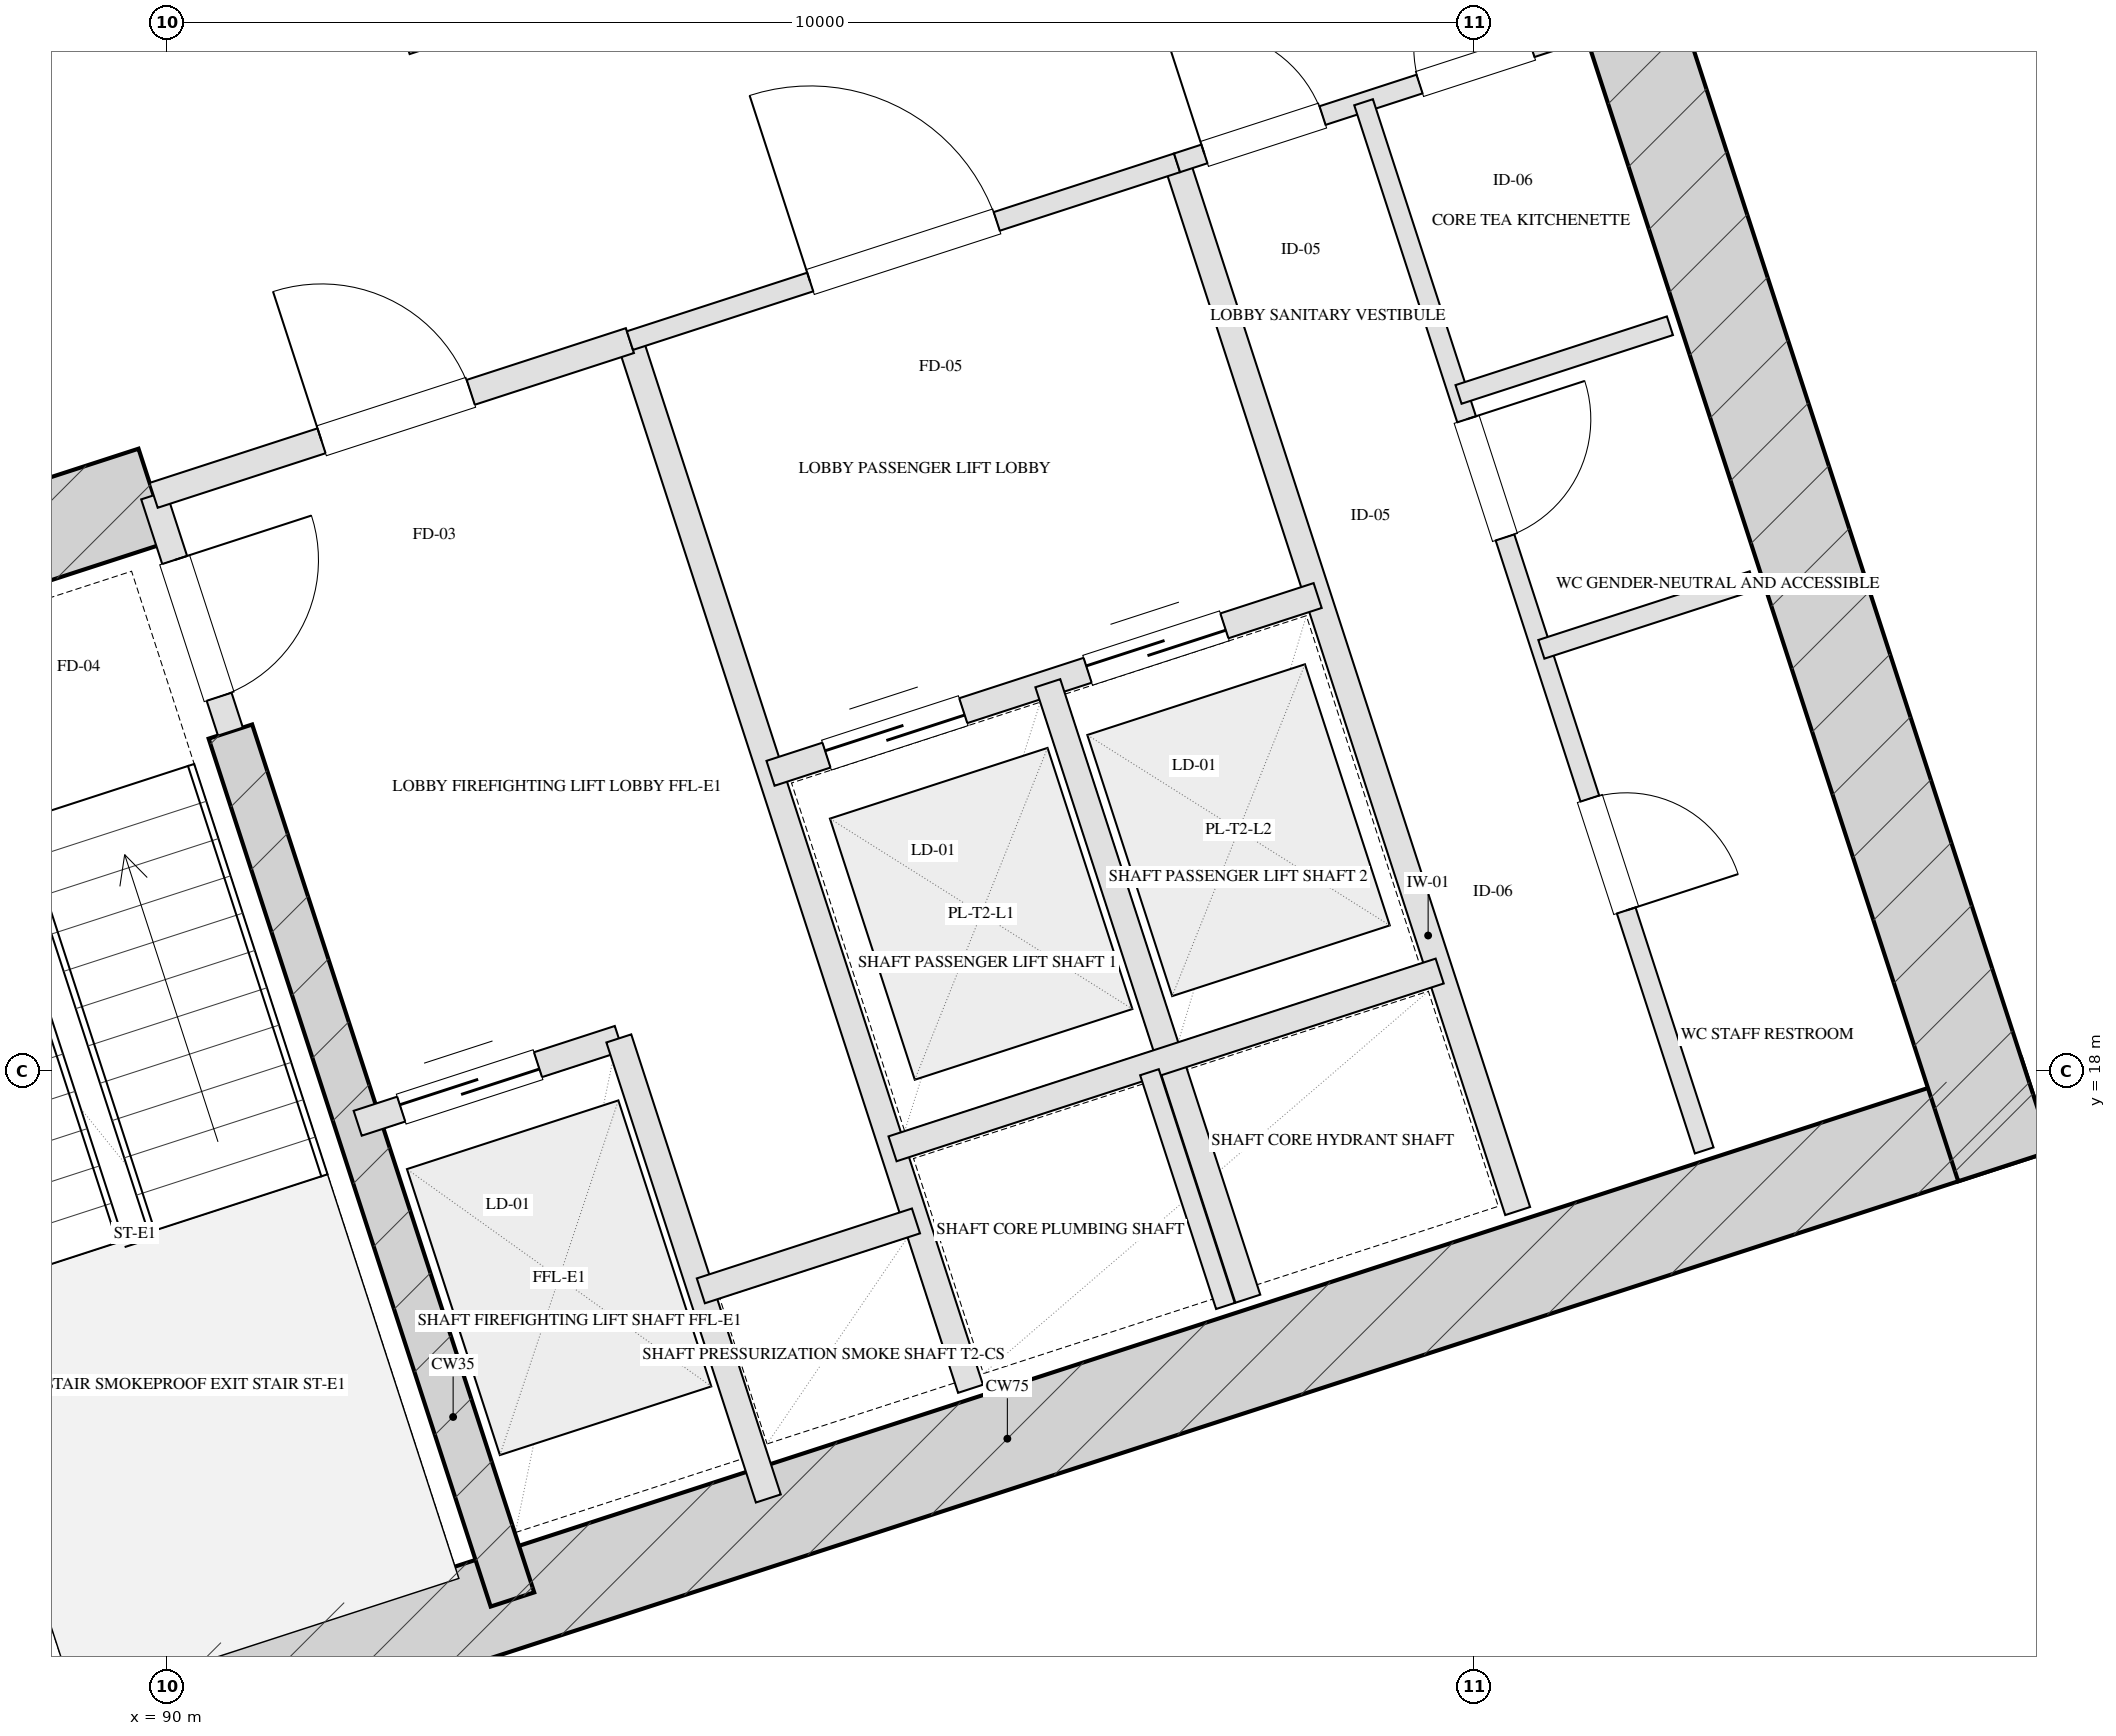
"""IFC4 building model, lengths in metres.
Left out: names, types, materials, properties, quantities, classifications, styles, units other than length and angle.
Written with IfcOpenShell. Run it as: python <this file> out.ifc"""

import sys

from ifc_helpers import new_model, si_unit, direction, frame, frame_2d, origin, place, context, subcontext, project, spatial, rectangle, extrude, element, fill, save


model = new_model("IFC4")
c1 = context("Model", 3, precision=1e-05, world=origin(), true_north=direction((0.0, 1.0)))
c2 = subcontext(c1, "Body", "Model", "MODEL_VIEW")
j1 = project(units=[si_unit("LENGTHUNIT", "METRE"), si_unit("PLANEANGLEUNIT", "RADIAN")], contexts=[c1])
p1 = place(None, origin())
s1 = spatial("IfcSite", under=j1, at=p1, CompositionType="ELEMENT")
p2 = place(p1, origin())
s2 = spatial("IfcBuilding", under=s1, at=p2, CompositionType="ELEMENT")
p3 = place(p2, frame((0.0, 0.0, 26.0)))
s3 = spatial("IfcBuildingStorey", under=s2, at=p3, CompositionType="ELEMENT", Elevation=26.0)
p4 = place(p3, frame((88.559, 12.629, 0.0), z_axis=(0.0, 0.0, 1.0), x_axis=(0.951056072937, 0.309018358888, 0.0)))
e1 = element("IfcWall", 1, at=p4, inside=s3, PredefinedType="SHEAR", context=c2, shape_type="SweptSolid", body=[
    extrude(rectangle(XDim=16.55, YDim=0.75, at=frame_2d((8.275, 0.0))), origin(), (0.0, 0.0, 1.0), 4.0),
])
p5 = place(p3, frame((86.055, 21.546, 0.0), z_axis=(0.0, 0.0, 1.0), x_axis=(0.309023585745, -0.951054374604, 0.0)))
e2 = element("IfcWall", 2, at=p5, inside=s3, PredefinedType="SHEAR", context=c2, shape_type="SweptSolid", body=[
    extrude(rectangle(XDim=9.63, YDim=0.75, at=frame_2d((4.815, 0.0))), origin(), (0.0, 0.0, 1.0), 4.0),
])
p6 = place(p3, frame((101.082, 26.429, 0.0), z_axis=(0.0, 0.0, 1.0), x_axis=(0.309016134813, -0.951056795583, 0.0)))
e3 = element("IfcWall", 3, at=p6, inside=s3, PredefinedType="SHEAR", context=c2, shape_type="SweptSolid", body=[
    extrude(rectangle(XDim=9.63, YDim=0.75, at=frame_2d((4.815, 0.0))), origin(), (0.0, 0.0, 1.0), 4.0),
])
p7 = place(p3, frame((90.486, 20.594, 0.0), z_axis=(0.0, 0.0, 1.0), x_axis=(0.309020428229, -0.951055400562, 0.0)))
e4 = element("IfcWall", 4, at=p7, inside=s3, PredefinedType="SHEAR", context=c2, shape_type="SweptSolid", body=[
    extrude(rectangle(XDim=6.98, YDim=0.35, at=frame_2d((3.49, 0.0))), origin(), (0.0, 0.0, 1.0), 4.0),
])
p8 = place(p3, frame((85.814, 21.074, 0.0), z_axis=(0.0, 0.0, 1.0), x_axis=(0.95106580992, 0.308988390074, 0.0)))
e5 = element("IfcWall", 5, at=p8, inside=s3, PredefinedType="SHEAR", context=c2, shape_type="SweptSolid", body=[
    extrude(rectangle(XDim=4.295, YDim=0.75, at=frame_2d((2.147, 0.0))), origin(), (0.0, 0.0, 1.0), 4.0),
])
p9 = place(p3, frame((100.345, 63.648, 0.0), z_axis=(0.0, 0.0, 1.0), x_axis=(0.309014526607, -0.951057318118, 0.0)))
e6 = element("IfcWall", 6, at=p9, inside=s3, PredefinedType="SOLIDWALL", context=c2, shape_type="SweptSolid", body=[
    extrude(rectangle(XDim=50.0, YDim=0.4, at=frame_2d((25.0, 0.0))), origin(), (0.0, 0.0, 1.0), 3.16),
])
p10 = place(p9, frame((30.15, 0.0, 0.75)))
e7 = element("IfcOpeningElement", 7, at=p10, cuts=e6, PredefinedType="OPENING", context=c2, shape_type="SweptSolid", body=[
    extrude(rectangle(XDim=2.5, YDim=1.75, at=frame_2d((1.25, 0.875))), frame((0.0, 0.21, 0.0), z_axis=(0.0, -1.0, 0.0), x_axis=(1.0, 0.0, 0.0)), (0.0, 0.0, 1.0), 0.42),
])
p11 = place(p9, frame((21.15, 0.0, 0.75)))
e8 = element("IfcOpeningElement", 8, at=p11, cuts=e6, PredefinedType="OPENING", context=c2, shape_type="SweptSolid", body=[
    extrude(rectangle(XDim=2.5, YDim=1.75, at=frame_2d((1.25, 0.875))), frame((0.0, 0.21, 0.0), z_axis=(0.0, -1.0, 0.0), x_axis=(1.0, 0.0, 0.0)), (0.0, 0.0, 1.0), 0.42),
])
p12 = place(p3, frame((89.899, 22.401, 0.0), z_axis=(0.0, 0.0, 1.0), x_axis=(0.308932062672, -0.951084108086, 0.0)))
e9 = element("IfcWall", 9, at=p12, inside=s3, PredefinedType="PARTITIONING", context=c2, shape_type="SweptSolid", body=[
    extrude(rectangle(XDim=1.9, YDim=0.2, at=frame_2d((0.95, 0.0))), origin(), (0.0, 0.0, 1.0), 3.725),
])
p13 = place(p12, frame((0.52, 0.0, 0.0)))
e10 = element("IfcOpeningElement", 10, at=p13, cuts=e9, PredefinedType="OPENING", context=c2, shape_type="SweptSolid", body=[
    extrude(rectangle(XDim=1.1, YDim=2.05, at=frame_2d((0.55, 1.025))), frame((0.0, 0.11, 0.0), z_axis=(0.0, -1.0, 0.0), x_axis=(1.0, 0.0, 0.0)), (0.0, 0.0, 1.0), 0.22),
])
p14 = place(p3, frame((93.542, 23.585, 0.0), z_axis=(0.0, 0.0, 1.0), x_axis=(0.309042196757, -0.951048327176, 0.0)))
e11 = element("IfcWall", 11, at=p14, inside=s3, PredefinedType="PARTITIONING", context=c2, shape_type="SweptSolid", body=[
    extrude(rectangle(XDim=8.43, YDim=0.2, at=frame_2d((4.215, 0.0))), origin(), (0.0, 0.0, 1.0), 3.725),
])
p15 = place(p3, frame((89.899, 22.401, 0.0), z_axis=(0.0, 0.0, 1.0), x_axis=(0.951046716504, 0.309047153403, 0.0)))
e12 = element("IfcWall", 12, at=p15, inside=s3, PredefinedType="PARTITIONING", context=c2, shape_type="SweptSolid", body=[
    extrude(rectangle(XDim=3.83, YDim=0.2, at=frame_2d((1.915, 0.0))), origin(), (0.0, 0.0, 1.0), 3.725),
])
p16 = place(p15, frame((1.35, 0.0, 0.0)))
e13 = element("IfcOpeningElement", 13, at=p16, cuts=e12, PredefinedType="OPENING", context=c2, shape_type="SweptSolid", body=[
    extrude(rectangle(XDim=1.2, YDim=2.05, at=frame_2d((0.6, 1.025))), frame((0.0, 0.11, 0.0), z_axis=(0.0, -1.0, 0.0), x_axis=(1.0, 0.0, 0.0)), (0.0, 0.0, 1.0), 0.22),
])
p17 = place(p3, frame((91.46, 17.598, 0.0), z_axis=(0.0, 0.0, 1.0), x_axis=(0.951062257173, 0.308999325213, 0.0)))
e14 = element("IfcWall", 14, at=p17, inside=s3, PredefinedType="PARTITIONING", context=c2, shape_type="SweptSolid", body=[
    extrude(rectangle(XDim=2.1, YDim=0.2, at=frame_2d((1.05, 0.0))), origin(), (0.0, 0.0, 1.0), 3.725),
])
p18 = place(p17, frame((0.35, 0.0, 0.0)))
e15 = element("IfcOpeningElement", 15, at=p18, cuts=e14, PredefinedType="OPENING", context=c2, shape_type="SweptSolid", body=[
    extrude(rectangle(XDim=1.1, YDim=2.05, at=frame_2d((0.55, 1.025))), frame((0.0, 0.11, 0.0), z_axis=(0.0, -1.0, 0.0), x_axis=(1.0, 0.0, 0.0)), (0.0, 0.0, 1.0), 0.22),
])
p19 = place(p3, frame((93.457, 18.247, 0.0), z_axis=(0.0, 0.0, 1.0), x_axis=(0.3089935693, -0.951064127245, 0.0)))
e16 = element("IfcWall", 16, at=p19, inside=s3, PredefinedType="PARTITIONING", context=c2, shape_type="SweptSolid", body=[
    extrude(rectangle(XDim=3.7, YDim=0.2, at=frame_2d((1.85, 0.0))), origin(), (0.0, 0.0, 1.0), 3.725),
])
p20 = place(p3, frame((94.084, 16.317, 0.0), z_axis=(0.0, 0.0, 1.0), x_axis=(0.951041328149, 0.309063734775, 0.0)))
e17 = element("IfcWall", 17, at=p20, inside=s3, PredefinedType="PARTITIONING", context=c2, shape_type="SweptSolid", body=[
    extrude(rectangle(XDim=1.73, YDim=0.2, at=frame_2d((0.865, 0.0))), origin(), (0.0, 0.0, 1.0), 3.725),
])
p21 = place(p3, frame((97.727, 24.944, 0.0), z_axis=(0.0, 0.0, 1.0), x_axis=(0.309016001439, -0.951056838919, 0.0)))
e18 = element("IfcWall", 18, at=p21, inside=s3, PredefinedType="PARTITIONING", context=c2, shape_type="SweptSolid", body=[
    extrude(rectangle(XDim=8.43, YDim=0.2, at=frame_2d((4.215, 0.0))), origin(), (0.0, 0.0, 1.0), 3.725),
])
p22 = place(p3, frame((93.542, 23.585, 0.0), z_axis=(0.0, 0.0, 1.0), x_axis=(0.951063829732, 0.308994485023, 0.0)))
e19 = element("IfcWall", 19, at=p22, inside=s3, PredefinedType="PARTITIONING", context=c2, shape_type="SweptSolid", body=[
    extrude(rectangle(XDim=4.4, YDim=0.15, at=frame_2d((2.2, 0.0))), origin(), (0.0, 0.0, 1.0), 3.725),
])
p23 = place(p22, frame((1.45, 0.0, 0.0)))
e20 = element("IfcOpeningElement", 20, at=p23, cuts=e19, PredefinedType="OPENING", context=c2, shape_type="SweptSolid", body=[
    extrude(rectangle(XDim=1.5, YDim=2.05, at=frame_2d((0.75, 1.025))), frame((0.0, 0.085, 0.0), z_axis=(0.0, -1.0, 0.0), x_axis=(1.0, 0.0, 0.0)), (0.0, 0.0, 1.0), 0.17),
])
p24 = place(p3, frame((94.617, 20.275, 0.0), z_axis=(0.0, 0.0, 1.0), x_axis=(0.951058531764, 0.30901079133, 0.0)))
e21 = element("IfcWall", 21, at=p24, inside=s3, PredefinedType="PARTITIONING", context=c2, shape_type="SweptSolid", body=[
    extrude(rectangle(XDim=4.4, YDim=0.2, at=frame_2d((2.2, 0.0))), origin(), (0.0, 0.0, 1.0), 3.725),
])
p25 = place(p24, frame((0.45, 0.0, 0.0)))
e22 = element("IfcOpeningElement", 22, at=p25, cuts=e21, PredefinedType="OPENING", context=c2, shape_type="SweptSolid", body=[
    extrude(rectangle(XDim=1.1, YDim=2.05, at=frame_2d((0.55, 1.025))), frame((0.0, 0.11, 0.0), z_axis=(0.0, -1.0, 0.0), x_axis=(1.0, 0.0, 0.0)), (0.0, 0.0, 1.0), 0.22),
])
p26 = place(p24, frame((2.55, 0.0, 0.0)))
e23 = element("IfcOpeningElement", 23, at=p26, cuts=e21, PredefinedType="OPENING", context=c2, shape_type="SweptSolid", body=[
    extrude(rectangle(XDim=1.1, YDim=2.05, at=frame_2d((0.55, 1.025))), frame((0.0, 0.11, 0.0), z_axis=(0.0, -1.0, 0.0), x_axis=(1.0, 0.0, 0.0)), (0.0, 0.0, 1.0), 0.22),
])
p27 = place(p3, frame((96.738, 20.964, 0.0), z_axis=(0.0, 0.0, 1.0), x_axis=(0.309042578481, -0.951048203135, 0.0)))
e24 = element("IfcWall", 24, at=p27, inside=s3, PredefinedType="PARTITIONING", context=c2, shape_type="SweptSolid", body=[
    extrude(rectangle(XDim=4.95, YDim=0.2, at=frame_2d((2.475, 0.0))), origin(), (0.0, 0.0, 1.0), 3.725),
])
p28 = place(p3, frame((95.551, 17.403, 0.0), z_axis=(0.0, 0.0, 1.0), x_axis=(0.951058531764, 0.30901079133, 0.0)))
e25 = element("IfcWall", 25, at=p28, inside=s3, PredefinedType="PARTITIONING", context=c2, shape_type="SweptSolid", body=[
    extrude(rectangle(XDim=4.4, YDim=0.2, at=frame_2d((2.2, 0.0))), origin(), (0.0, 0.0, 1.0), 3.725),
])
p29 = place(p3, frame((97.516, 17.989, 0.0), z_axis=(0.0, 0.0, 1.0), x_axis=(0.30897153969, -0.951071284217, 0.0)))
e26 = element("IfcWall", 26, at=p29, inside=s3, PredefinedType="PARTITIONING", context=c2, shape_type="SweptSolid", body=[
    extrude(rectangle(XDim=1.88, YDim=0.15, at=frame_2d((0.94, 0.0))), origin(), (0.0, 0.0, 1.0), 3.725),
])
p30 = place(p3, frame((97.727, 24.944, 0.0), z_axis=(0.0, 0.0, 1.0), x_axis=(0.951036872128, 0.309077446369, 0.0)))
e27 = element("IfcWall", 27, at=p30, inside=s3, PredefinedType="PARTITIONING", context=c2, shape_type="SweptSolid", body=[
    extrude(rectangle(XDim=3.2, YDim=0.15, at=frame_2d((1.6, 0.0))), origin(), (0.0, 0.0, 1.0), 3.725),
])
p31 = place(p30, frame((0.22, 0.0, 0.0)))
e28 = element("IfcOpeningElement", 28, at=p31, cuts=e27, PredefinedType="OPENING", context=c2, shape_type="SweptSolid", body=[
    extrude(rectangle(XDim=0.95, YDim=2.05, at=frame_2d((0.475, 1.025))), frame((0.0, 0.085, 0.0), z_axis=(0.0, -1.0, 0.0), x_axis=(1.0, 0.0, 0.0)), (0.0, 0.0, 1.0), 0.17),
])
p32 = place(p30, frame((1.95, 0.0, 0.0)))
e29 = element("IfcOpeningElement", 29, at=p32, cuts=e27, PredefinedType="OPENING", context=c2, shape_type="SweptSolid", body=[
    extrude(rectangle(XDim=0.9, YDim=2.05, at=frame_2d((0.45, 1.025))), frame((0.0, 0.085, 0.0), z_axis=(0.0, -1.0, 0.0), x_axis=(1.0, 0.0, 0.0)), (0.0, 0.0, 1.0), 0.17),
])
p33 = place(p3, frame((99.153, 25.408, 0.0), z_axis=(0.0, 0.0, 1.0), x_axis=(0.309016001439, -0.951056838919, 0.0)))
e30 = element("IfcWall", 30, at=p33, inside=s3, PredefinedType="PARTITIONING", context=c2, shape_type="SweptSolid", body=[
    extrude(rectangle(XDim=8.43, YDim=0.15, at=frame_2d((4.215, 0.0))), origin(), (0.0, 0.0, 1.0), 3.725),
])
p34 = place(p33, frame((2.55, 0.0, 0.0)))
e31 = element("IfcOpeningElement", 31, at=p34, cuts=e30, PredefinedType="OPENING", context=c2, shape_type="SweptSolid", body=[
    extrude(rectangle(XDim=0.95, YDim=2.05, at=frame_2d((0.475, 1.025))), frame((0.0, 0.085, 0.0), z_axis=(0.0, -1.0, 0.0), x_axis=(1.0, 0.0, 0.0)), (0.0, 0.0, 1.0), 0.17),
])
p35 = place(p33, frame((5.6, 0.0, 0.0)))
e32 = element("IfcOpeningElement", 32, at=p35, cuts=e30, PredefinedType="OPENING", context=c2, shape_type="SweptSolid", body=[
    extrude(rectangle(XDim=0.9, YDim=2.05, at=frame_2d((0.45, 1.025))), frame((0.0, 0.085, 0.0), z_axis=(0.0, -1.0, 0.0), x_axis=(1.0, 0.0, 0.0)), (0.0, 0.0, 1.0), 0.17),
])
for number, where, z_axis, x_axis in (
    (33, (100.513, 21.223, 0.0), (0.0, 0.0, 1.0), (0.951, 0.309, 0.0)),
    (34, (99.879, 23.173, 0.0), (0.0, 0.0, 1.0), (0.951, 0.309, 0.0)),
):
    element("IfcWall", number, at=place(p3, frame(where, z_axis=z_axis, x_axis=x_axis)), inside=s3, PredefinedType="PARTITIONING", context=c2, shape_type="SweptSolid", body=[
        extrude(rectangle(XDim=1.7, YDim=0.15, at=frame_2d((0.85, 0.0))), origin(), (0.0, 0.0, 1.0), 3.725),
    ])
p36 = place(p3, frame((91.834, 25.848, 0.0), z_axis=(0.0, 0.0, 1.0), x_axis=(0.951055605195, 0.309019798438, 0.0)))
e35 = element("IfcWall", 35, at=p36, inside=s3, PredefinedType="PARTITIONING", context=c2, shape_type="SweptSolid", body=[
    extrude(rectangle(XDim=19.575, YDim=0.15, at=frame_2d((9.788, 0.0))), origin(), (0.0, 0.0, 1.0), 3.725),
])
p37 = place(p13, origin())
e36 = element("IfcDoor", 36, at=p37, inside=s3, OperationType="SINGLE_SWING_LEFT", PredefinedType="DOOR", context=c2, shape_type="SweptSolid", body=[
    extrude(rectangle(XDim=1.1, YDim=2.05, at=frame_2d((0.55, 1.025))), frame((0.0, 0.025, 0.0), z_axis=(0.0, -1.0, 0.0), x_axis=(1.0, 0.0, 0.0)), (0.0, 0.0, 1.0), 0.05),
])
fill(e10, e36)
p38 = place(p16, origin())
e37 = element("IfcDoor", 37, at=p38, inside=s3, OperationType="SINGLE_SWING_LEFT", PredefinedType="DOOR", context=c2, shape_type="SweptSolid", body=[
    extrude(rectangle(XDim=1.2, YDim=2.05, at=frame_2d((0.6, 1.025))), frame((0.0, 0.025, 0.0), z_axis=(0.0, -1.0, 0.0), x_axis=(1.0, 0.0, 0.0)), (0.0, 0.0, 1.0), 0.05),
])
fill(e13, e37)
p39 = place(p18, origin())
e38 = element("IfcDoor", 38, at=p39, inside=s3, OperationType="DOUBLE_DOOR_SLIDING", PredefinedType="DOOR", context=c2, shape_type="SweptSolid", body=[
    extrude(rectangle(XDim=1.1, YDim=2.05, at=frame_2d((0.55, 1.025))), frame((0.0, 0.025, 0.0), z_axis=(0.0, -1.0, 0.0), x_axis=(1.0, 0.0, 0.0)), (0.0, 0.0, 1.0), 0.05),
])
fill(e15, e38)
p40 = place(p23, origin())
e39 = element("IfcDoor", 39, at=p40, inside=s3, OperationType="SINGLE_SWING_LEFT", PredefinedType="DOOR", context=c2, shape_type="SweptSolid", body=[
    extrude(rectangle(XDim=1.5, YDim=2.05, at=frame_2d((0.75, 1.025))), frame((0.0, 0.025, 0.0), z_axis=(0.0, -1.0, 0.0), x_axis=(1.0, 0.0, 0.0)), (0.0, 0.0, 1.0), 0.05),
])
fill(e20, e39)
p41 = place(p25, origin())
e40 = element("IfcDoor", 40, at=p41, inside=s3, OperationType="DOUBLE_DOOR_SLIDING", PredefinedType="DOOR", context=c2, shape_type="SweptSolid", body=[
    extrude(rectangle(XDim=1.1, YDim=2.05, at=frame_2d((0.55, 1.025))), frame((0.0, 0.025, 0.0), z_axis=(0.0, -1.0, 0.0), x_axis=(1.0, 0.0, 0.0)), (0.0, 0.0, 1.0), 0.05),
])
fill(e22, e40)
p42 = place(p26, origin())
e41 = element("IfcDoor", 41, at=p42, inside=s3, OperationType="DOUBLE_DOOR_SLIDING", PredefinedType="DOOR", context=c2, shape_type="SweptSolid", body=[
    extrude(rectangle(XDim=1.1, YDim=2.05, at=frame_2d((0.55, 1.025))), frame((0.0, 0.025, 0.0), z_axis=(0.0, -1.0, 0.0), x_axis=(1.0, 0.0, 0.0)), (0.0, 0.0, 1.0), 0.05),
])
fill(e23, e41)
p43 = place(p31, origin())
e42 = element("IfcDoor", 42, at=p43, inside=s3, OperationType="SINGLE_SWING_LEFT", PredefinedType="DOOR", context=c2, shape_type="SweptSolid", body=[
    extrude(rectangle(XDim=0.95, YDim=2.05, at=frame_2d((0.475, 1.025))), frame((0.0, 0.025, 0.0), z_axis=(0.0, -1.0, 0.0), x_axis=(1.0, 0.0, 0.0)), (0.0, 0.0, 1.0), 0.05),
])
fill(e28, e42)
p44 = place(p32, origin())
e43 = element("IfcDoor", 43, at=p44, inside=s3, OperationType="SINGLE_SWING_RIGHT", PredefinedType="DOOR", context=c2, shape_type="SweptSolid", body=[
    extrude(rectangle(XDim=0.9, YDim=2.05, at=frame_2d((0.45, 1.025))), frame((0.0, 0.025, 0.0), z_axis=(0.0, -1.0, 0.0), x_axis=(1.0, 0.0, 0.0)), (0.0, 0.0, 1.0), 0.05),
])
fill(e29, e43)
p45 = place(p34, origin())
e44 = element("IfcDoor", 44, at=p45, inside=s3, OperationType="SINGLE_SWING_LEFT", PredefinedType="DOOR", context=c2, shape_type="SweptSolid", body=[
    extrude(rectangle(XDim=0.95, YDim=2.05, at=frame_2d((0.475, 1.025))), frame((0.0, 0.025, 0.0), z_axis=(0.0, -1.0, 0.0), x_axis=(1.0, 0.0, 0.0)), (0.0, 0.0, 1.0), 0.05),
])
fill(e31, e44)
p46 = place(p35, origin())
e45 = element("IfcDoor", 45, at=p46, inside=s3, OperationType="SINGLE_SWING_RIGHT", PredefinedType="DOOR", context=c2, shape_type="SweptSolid", body=[
    extrude(rectangle(XDim=0.9, YDim=2.05, at=frame_2d((0.45, 1.025))), frame((0.0, 0.025, 0.0), z_axis=(0.0, -1.0, 0.0), x_axis=(1.0, 0.0, 0.0)), (0.0, 0.0, 1.0), 0.05),
])
fill(e32, e45)
save(model, sys.argv[1])
